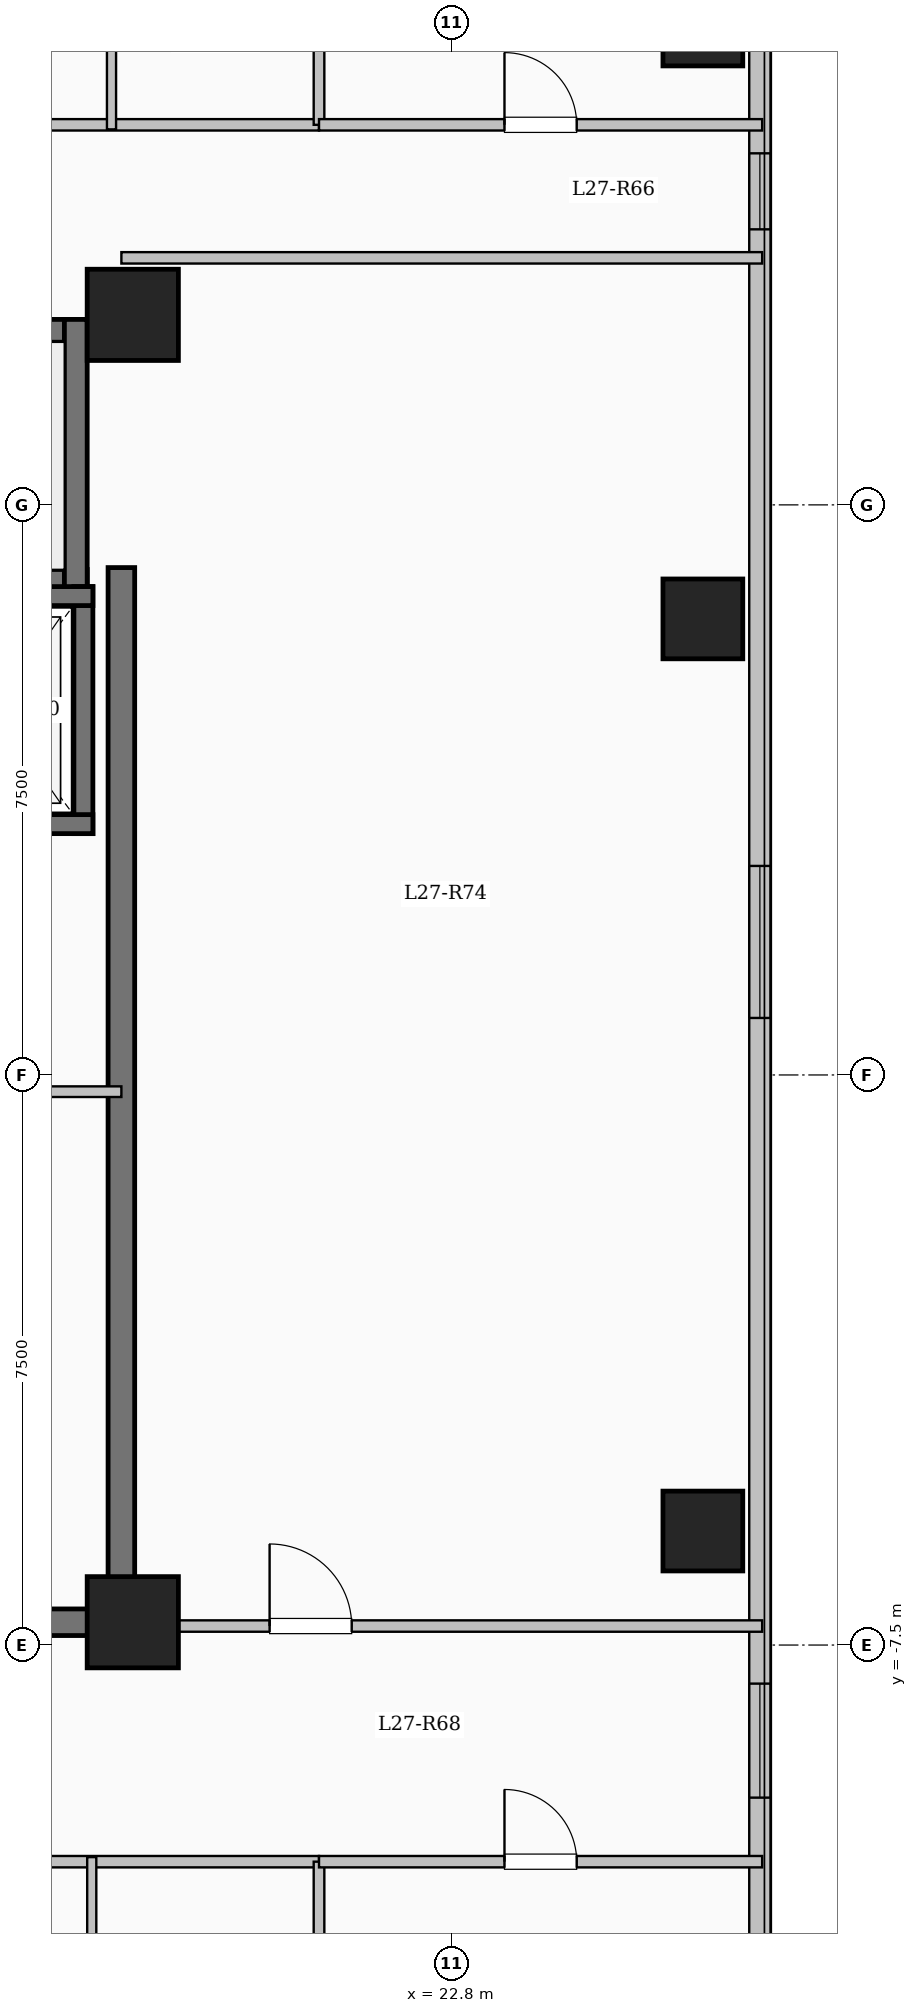
"""IFC4 building model, lengths in metres.
Left out: names, types, materials, properties, quantities, classifications, styles, units other than length and angle.
Written with IfcOpenShell. Run it as: python <this file> out.ifc"""

import sys

from ifc_helpers import new_model, si_unit, direction, frame, frame_2d, origin, origin_2d, place, context, subcontext, project, spatial, rectangle, extrude, element, fill, save


model = new_model("IFC4")
c1 = context("Model", 3, precision=1e-05, world=origin(), true_north=direction((0.0, 1.0)))
c2 = subcontext(c1, "Body", "Model", "MODEL_VIEW")
j1 = project(units=[si_unit("LENGTHUNIT", "METRE"), si_unit("PLANEANGLEUNIT", "RADIAN")], contexts=[c1])
p1 = place(None, origin())
s1 = spatial("IfcSite", under=j1, at=p1, CompositionType="ELEMENT")
p2 = place(p1, origin())
s2 = spatial("IfcBuilding", under=s1, at=p2, CompositionType="ELEMENT")
p3 = place(p2, frame((0.0, 0.0, 101.75)))
s3 = spatial("IfcBuildingStorey", under=s2, at=p3, CompositionType="ELEMENT", Elevation=101.75)
for number, where, z_axis, x_axis in (
    (1, (18.6, -7.2, 0.0), (0.0, 0.0, 1.0), (1.0, 0.0, 0.0)),
    (2, (18.6, 10.0, 0.0), (0.0, 0.0, 1.0), (1.0, 0.0, 0.0)),
):
    element("IfcColumn", number, at=place(p3, frame(where, z_axis=z_axis, x_axis=x_axis)), inside=s3, PredefinedType="COLUMN", context=c2, shape_type="SweptSolid", body=[
        extrude(rectangle(XDim=1.2, YDim=1.2, at=origin_2d()), origin(), (0.0, 0.0, 1.0), 3.35),
    ])
for number, where, z_axis, x_axis in (
    (3, (26.1, -6.0, 0.0), (0.0, 0.0, 1.0), (1.0, 0.0, 0.0)),
    (4, (26.1, 6.0, 0.0), (0.0, 0.0, 1.0), (1.0, 0.0, 0.0)),
    (5, (26.1, 13.8, 0.0), (0.0, 0.0, 1.0), (1.0, 0.0, 0.0)),
):
    element("IfcColumn", number, at=place(p3, frame(where, z_axis=z_axis, x_axis=x_axis)), inside=s3, PredefinedType="COLUMN", context=c2, shape_type="SweptSolid", body=[
        extrude(rectangle(XDim=1.05, YDim=1.05, at=origin_2d()), origin(), (0.0, 0.0, 1.0), 3.35),
    ])
p4 = place(p3, frame((26.85, 17.85, 0.0), z_axis=(0.0, 0.0, 1.0), x_axis=(0.0, -1.0, 0.0)))
e6 = element("IfcWall", 6, at=p4, inside=s3, PredefinedType="SOLIDWALL", context=c2, shape_type="SweptSolid", body=[
    extrude(rectangle(XDim=35.7, YDim=0.28, at=frame_2d((17.85, 0.0))), origin(), (0.0, 0.0, 1.0), 3.1),
])
p5 = place(p4, frame((1.675, 0.0, 0.9)))
e7 = element("IfcOpeningElement", 7, at=p5, cuts=e6, PredefinedType="OPENING", context=c2, shape_type="SweptSolid", body=[
    extrude(rectangle(XDim=2.0, YDim=1.7, at=frame_2d((1.0, 0.85))), frame((0.0, 0.15, 0.0), z_axis=(0.0, -1.0, 0.0), x_axis=(1.0, 0.0, 0.0)), (0.0, 0.0, 1.0), 0.3),
])
p6 = place(p4, frame((5.725, 0.0, 0.95)))
e8 = element("IfcOpeningElement", 8, at=p6, cuts=e6, PredefinedType="OPENING", context=c2, shape_type="SweptSolid", body=[
    extrude(rectangle(XDim=1.0, YDim=1.5, at=frame_2d((0.5, 0.75))), frame((0.0, 0.15, 0.0), z_axis=(0.0, -1.0, 0.0), x_axis=(1.0, 0.0, 0.0)), (0.0, 0.0, 1.0), 0.3),
])
p7 = place(p4, frame((15.1, 0.0, 0.9)))
e9 = element("IfcOpeningElement", 9, at=p7, cuts=e6, PredefinedType="OPENING", context=c2, shape_type="SweptSolid", body=[
    extrude(rectangle(XDim=2.0, YDim=1.7, at=frame_2d((1.0, 0.85))), frame((0.0, 0.15, 0.0), z_axis=(0.0, -1.0, 0.0), x_axis=(1.0, 0.0, 0.0)), (0.0, 0.0, 1.0), 0.3),
])
p8 = place(p4, frame((25.857, 0.0, 0.9)))
e10 = element("IfcOpeningElement", 10, at=p8, cuts=e6, PredefinedType="OPENING", context=c2, shape_type="SweptSolid", body=[
    extrude(rectangle(XDim=1.5, YDim=1.65, at=frame_2d((0.75, 0.825))), frame((0.0, 0.15, 0.0), z_axis=(0.0, -1.0, 0.0), x_axis=(1.0, 0.0, 0.0)), (0.0, 0.0, 1.0), 0.3),
])
p9 = place(p4, frame((30.75, 0.0, 0.9)))
e11 = element("IfcOpeningElement", 11, at=p9, cuts=e6, PredefinedType="OPENING", context=c2, shape_type="SweptSolid", body=[
    extrude(rectangle(XDim=2.4, YDim=1.8, at=frame_2d((1.2, 0.9))), frame((0.0, 0.15, 0.0), z_axis=(0.0, -1.0, 0.0), x_axis=(1.0, 0.0, 0.0)), (0.0, 0.0, 1.0), 0.3),
])
p10 = place(p3, frame((10.0, 9.79, 0.0), z_axis=(0.0, 0.0, 1.0), x_axis=(1.0, 0.0, 0.0)))
e12 = element("IfcWall", 12, at=p10, inside=s3, PredefinedType="SHEAR", context=c2, shape_type="SweptSolid", body=[
    extrude(rectangle(XDim=8.0, YDim=0.3, at=frame_2d((4.0, 0.0))), origin(), (0.0, 0.0, 1.0), 3.35),
])
p11 = place(p3, frame((10.0, 6.5, 0.0), z_axis=(0.0, 0.0, 1.0), x_axis=(1.0, 0.0, 0.0)))
e13 = element("IfcWall", 13, at=p11, inside=s3, PredefinedType="SHEAR", context=c2, shape_type="SweptSolid", body=[
    extrude(rectangle(XDim=8.0, YDim=0.3, at=frame_2d((4.0, 0.0))), origin(), (0.0, 0.0, 1.0), 3.35),
])
p12 = place(p11, frame((0.55, 0.0, 0.0)))
e14 = element("IfcOpeningElement", 14, at=p12, cuts=e13, PredefinedType="OPENING", context=c2, shape_type="SweptSolid", body=[
    extrude(rectangle(XDim=1.0, YDim=2.15, at=frame_2d((0.5, 1.075))), frame((0.0, 0.16, 0.0), z_axis=(0.0, -1.0, 0.0), x_axis=(1.0, 0.0, 0.0)), (0.0, 0.0, 1.0), 0.32),
])
p13 = place(p3, frame((17.85, 6.35, 0.0), z_axis=(0.0, 0.0, 1.0), x_axis=(0.0, 1.0, 0.0)))
e15 = element("IfcWall", 15, at=p13, inside=s3, PredefinedType="SHEAR", context=c2, shape_type="SweptSolid", body=[
    extrude(rectangle(XDim=3.59, YDim=0.3, at=frame_2d((1.795, 0.0))), origin(), (0.0, 0.0, 1.0), 3.35),
])
p14 = place(p3, frame((17.95, 3.175, 0.0), z_axis=(0.0, 0.0, 1.0), x_axis=(0.0, 1.0, 0.0)))
e16 = element("IfcWall", 16, at=p14, inside=s3, PredefinedType="SHEAR", context=c2, shape_type="SweptSolid", body=[
    extrude(rectangle(XDim=3.25, YDim=0.25, at=frame_2d((1.625, 0.0))), origin(), (0.0, 0.0, 1.0), 3.35),
])
for number, where, z_axis, x_axis in (
    (17, (15.525, 3.3, 0.0), (0.0, 0.0, 1.0), (1.0, 0.0, 0.0)),
    (18, (15.525, 6.3, 0.0), (0.0, 0.0, 1.0), (1.0, 0.0, 0.0)),
):
    element("IfcWall", number, at=place(p3, frame(where, z_axis=z_axis, x_axis=x_axis)), inside=s3, PredefinedType="SHEAR", context=c2, shape_type="SweptSolid", body=[
        extrude(rectangle(XDim=2.55, YDim=0.25, at=frame_2d((1.275, 0.0))), origin(), (0.0, 0.0, 1.0), 3.35),
    ])
p15 = place(p3, frame((18.45, -7.375, 0.0), z_axis=(0.0, 0.0, 1.0), x_axis=(0.0, 1.0, 0.0)))
e19 = element("IfcWall", 19, at=p15, inside=s3, PredefinedType="SHEAR", context=c2, shape_type="SweptSolid", body=[
    extrude(rectangle(XDim=14.05, YDim=0.35, at=frame_2d((7.025, 0.0))), origin(), (0.0, 0.0, 1.0), 3.35),
])
p16 = place(p3, frame((10.075, -7.2, 0.0), z_axis=(0.0, 0.0, 1.0), x_axis=(1.0, 0.0, 0.0)))
e20 = element("IfcWall", 20, at=p16, inside=s3, PredefinedType="SHEAR", context=c2, shape_type="SweptSolid", body=[
    extrude(rectangle(XDim=8.55, YDim=0.35, at=frame_2d((4.275, 0.0))), origin(), (0.0, 0.0, 1.0), 3.35),
])
p17 = place(p3, frame((15.4, -0.22, 0.0), z_axis=(0.0, 0.0, 1.0), x_axis=(1.0, 0.0, 0.0)))
e21 = element("IfcWall", 21, at=p17, inside=s3, PredefinedType="PARTITIONING", context=c2, shape_type="SweptSolid", body=[
    extrude(rectangle(XDim=3.05, YDim=0.14, at=frame_2d((1.525, 0.0))), origin(), (0.0, 0.0, 1.0), 3.1),
])
p18 = place(p17, frame((1.05, 0.0, 0.0)))
e22 = element("IfcOpeningElement", 22, at=p18, cuts=e21, PredefinedType="OPENING", context=c2, shape_type="SweptSolid", body=[
    extrude(rectangle(XDim=0.9, YDim=2.08, at=frame_2d((0.45, 1.04))), frame((0.0, 0.08, 0.0), z_axis=(0.0, -1.0, 0.0), x_axis=(1.0, 0.0, 0.0)), (0.0, 0.0, 1.0), 0.16),
])
p19 = place(p3, frame((3.85, 12.5, 0.0), z_axis=(0.0, 0.0, 1.0), x_axis=(1.0, 0.0, 0.0)))
e23 = element("IfcWall", 23, at=p19, inside=s3, PredefinedType="PARTITIONING", context=c2, shape_type="SweptSolid", body=[
    extrude(rectangle(XDim=17.2, YDim=0.15, at=frame_2d((8.6, 0.0))), origin(), (0.0, 0.0, 1.0), 3.1),
])
p20 = place(p19, frame((1.6, 0.0, 0.0)))
e24 = element("IfcOpeningElement", 24, at=p20, cuts=e23, PredefinedType="OPENING", context=c2, shape_type="SweptSolid", body=[
    extrude(rectangle(XDim=0.96, YDim=2.15, at=frame_2d((0.48, 1.075))), frame((0.0, 0.085, 0.0), z_axis=(0.0, -1.0, 0.0), x_axis=(1.0, 0.0, 0.0)), (0.0, 0.0, 1.0), 0.17),
])
p21 = place(p19, frame((6.42, 0.0, 0.0)))
e25 = element("IfcOpeningElement", 25, at=p21, cuts=e23, PredefinedType="OPENING", context=c2, shape_type="SweptSolid", body=[
    extrude(rectangle(XDim=0.96, YDim=2.15, at=frame_2d((0.48, 1.075))), frame((0.0, 0.085, 0.0), z_axis=(0.0, -1.0, 0.0), x_axis=(1.0, 0.0, 0.0)), (0.0, 0.0, 1.0), 0.17),
])
p22 = place(p3, frame((8.55, -10.35, 0.0), z_axis=(0.0, 0.0, 1.0), x_axis=(1.0, 0.0, 0.0)))
e26 = element("IfcWall", 26, at=p22, inside=s3, PredefinedType="PARTITIONING", context=c2, shape_type="SweptSolid", body=[
    extrude(rectangle(XDim=12.5, YDim=0.15, at=frame_2d((6.25, 0.0))), origin(), (0.0, 0.0, 1.0), 3.1),
])
p23 = place(p22, frame((0.75, 0.0, 0.0)))
e27 = element("IfcOpeningElement", 27, at=p23, cuts=e26, PredefinedType="OPENING", context=c2, shape_type="SweptSolid", body=[
    extrude(rectangle(XDim=0.96, YDim=2.15, at=frame_2d((0.48, 1.075))), frame((0.0, 0.085, 0.0), z_axis=(0.0, -1.0, 0.0), x_axis=(1.0, 0.0, 0.0)), (0.0, 0.0, 1.0), 0.17),
])
p24 = place(p22, frame((6.975, 0.0, 0.0)))
e28 = element("IfcOpeningElement", 28, at=p24, cuts=e26, PredefinedType="OPENING", context=c2, shape_type="SweptSolid", body=[
    extrude(rectangle(XDim=0.96, YDim=2.15, at=frame_2d((0.48, 1.075))), frame((0.0, 0.085, 0.0), z_axis=(0.0, -1.0, 0.0), x_axis=(1.0, 0.0, 0.0)), (0.0, 0.0, 1.0), 0.17),
])
p25 = place(p3, frame((18.32, 12.44, 0.0), z_axis=(0.0, 0.0, 1.0), x_axis=(0.0, 1.0, 0.0)))
e29 = element("IfcWall", 29, at=p25, inside=s3, PredefinedType="PARTITIONING", context=c2, shape_type="SweptSolid", body=[
    extrude(rectangle(XDim=2.45, YDim=0.12, at=frame_2d((1.225, 0.0))), origin(), (0.0, 0.0, 1.0), 3.1),
])
p26 = place(p3, frame((18.06, -13.51, 0.0), z_axis=(0.0, 0.0, 1.0), x_axis=(0.0, 1.0, 0.0)))
e30 = element("IfcWall", 30, at=p26, inside=s3, PredefinedType="PARTITIONING", context=c2, shape_type="SweptSolid", body=[
    extrude(rectangle(XDim=3.22, YDim=0.12, at=frame_2d((1.61, 0.0))), origin(), (0.0, 0.0, 1.0), 3.1),
])
p27 = place(p26, frame((1.14, 0.0, 0.0)))
e31 = element("IfcOpeningElement", 31, at=p27, cuts=e30, PredefinedType="OPENING", context=c2, shape_type="SweptSolid", body=[
    extrude(rectangle(XDim=0.88, YDim=2.1, at=frame_2d((0.44, 1.05))), frame((0.0, 0.07, 0.0), z_axis=(0.0, -1.0, 0.0), x_axis=(1.0, 0.0, 0.0)), (0.0, 0.0, 1.0), 0.14),
])
p28 = place(p3, frame((18.45, -7.25, 0.0), z_axis=(0.0, 0.0, 1.0), x_axis=(1.0, 0.0, 0.0)))
e32 = element("IfcWall", 32, at=p28, inside=s3, PredefinedType="PARTITIONING", context=c2, shape_type="SweptSolid", body=[
    extrude(rectangle(XDim=8.43, YDim=0.15, at=frame_2d((4.215, 0.0))), origin(), (0.0, 0.0, 1.0), 3.1),
])
p29 = place(p28, frame((1.95, 0.0, 0.0)))
e33 = element("IfcOpeningElement", 33, at=p29, cuts=e32, PredefinedType="OPENING", context=c2, shape_type="SweptSolid", body=[
    extrude(rectangle(XDim=1.08, YDim=2.15, at=frame_2d((0.54, 1.075))), frame((0.0, 0.085, 0.0), z_axis=(0.0, -1.0, 0.0), x_axis=(1.0, 0.0, 0.0)), (0.0, 0.0, 1.0), 0.17),
])
p30 = place(p3, frame((18.45, 10.75, 0.0), z_axis=(0.0, 0.0, 1.0), x_axis=(1.0, 0.0, 0.0)))
e34 = element("IfcWall", 34, at=p30, inside=s3, PredefinedType="PARTITIONING", context=c2, shape_type="SweptSolid", body=[
    extrude(rectangle(XDim=8.43, YDim=0.15, at=frame_2d((4.215, 0.0))), origin(), (0.0, 0.0, 1.0), 3.1),
])
p31 = place(p3, frame((21.05, -17.85, 0.0), z_axis=(0.0, 0.0, 1.0), x_axis=(0.0, 1.0, 0.0)))
e35 = element("IfcWall", 35, at=p31, inside=s3, PredefinedType="PARTITIONING", context=c2, shape_type="SweptSolid", body=[
    extrude(rectangle(XDim=7.5, YDim=0.14, at=frame_2d((3.75, 0.0))), origin(), (0.0, 0.0, 1.0), 3.1),
])
p32 = place(p3, frame((21.05, 12.5, 0.0), z_axis=(0.0, 0.0, 1.0), x_axis=(0.0, 1.0, 0.0)))
e36 = element("IfcWall", 36, at=p32, inside=s3, PredefinedType="PARTITIONING", context=c2, shape_type="SweptSolid", body=[
    extrude(rectangle(XDim=5.35, YDim=0.14, at=frame_2d((2.675, 0.0))), origin(), (0.0, 0.0, 1.0), 3.1),
])
p33 = place(p3, frame((21.05, 12.5, 0.0), z_axis=(0.0, 0.0, 1.0), x_axis=(1.0, 0.0, 0.0)))
e37 = element("IfcWall", 37, at=p33, inside=s3, PredefinedType="PARTITIONING", context=c2, shape_type="SweptSolid", body=[
    extrude(rectangle(XDim=5.83, YDim=0.15, at=frame_2d((2.915, 0.0))), origin(), (0.0, 0.0, 1.0), 3.1),
])
p34 = place(p33, frame((2.44, 0.0, 0.0)))
e38 = element("IfcOpeningElement", 38, at=p34, cuts=e37, PredefinedType="OPENING", context=c2, shape_type="SweptSolid", body=[
    extrude(rectangle(XDim=0.95, YDim=2.15, at=frame_2d((0.475, 1.075))), frame((0.0, 0.085, 0.0), z_axis=(0.0, -1.0, 0.0), x_axis=(1.0, 0.0, 0.0)), (0.0, 0.0, 1.0), 0.17),
])
p35 = place(p3, frame((21.05, -10.35, 0.0), z_axis=(0.0, 0.0, 1.0), x_axis=(1.0, 0.0, 0.0)))
e39 = element("IfcWall", 39, at=p35, inside=s3, PredefinedType="PARTITIONING", context=c2, shape_type="SweptSolid", body=[
    extrude(rectangle(XDim=5.83, YDim=0.15, at=frame_2d((2.915, 0.0))), origin(), (0.0, 0.0, 1.0), 3.1),
])
p36 = place(p35, frame((2.44, 0.0, 0.0)))
e40 = element("IfcOpeningElement", 40, at=p36, cuts=e39, PredefinedType="OPENING", context=c2, shape_type="SweptSolid", body=[
    extrude(rectangle(XDim=0.95, YDim=2.15, at=frame_2d((0.475, 1.075))), frame((0.0, 0.085, 0.0), z_axis=(0.0, -1.0, 0.0), x_axis=(1.0, 0.0, 0.0)), (0.0, 0.0, 1.0), 0.17),
])
p37 = place(p6, origin())
e41 = element("IfcWindow", 41, at=p37, inside=s3, PartitioningType="SINGLE_PANEL", PredefinedType="WINDOW", context=c2, shape_type="SweptSolid", body=[
    extrude(rectangle(XDim=1.0, YDim=1.5, at=frame_2d((0.5, 0.75))), frame((0.0, 0.03, 0.0), z_axis=(0.0, -1.0, 0.0), x_axis=(1.0, 0.0, 0.0)), (0.0, 0.0, 1.0), 0.06),
])
fill(e8, e41)
p38 = place(p7, origin())
e42 = element("IfcWindow", 42, at=p38, inside=s3, PartitioningType="SINGLE_PANEL", PredefinedType="WINDOW", context=c2, shape_type="SweptSolid", body=[
    extrude(rectangle(XDim=2.0, YDim=1.7, at=frame_2d((1.0, 0.85))), frame((0.0, 0.03, 0.0), z_axis=(0.0, -1.0, 0.0), x_axis=(1.0, 0.0, 0.0)), (0.0, 0.0, 1.0), 0.06),
])
fill(e9, e42)
p39 = place(p8, origin())
e43 = element("IfcWindow", 43, at=p39, inside=s3, PartitioningType="SINGLE_PANEL", PredefinedType="WINDOW", context=c2, shape_type="SweptSolid", body=[
    extrude(rectangle(XDim=1.5, YDim=1.65, at=frame_2d((0.75, 0.825))), frame((0.0, 0.03, 0.0), z_axis=(0.0, -1.0, 0.0), x_axis=(1.0, 0.0, 0.0)), (0.0, 0.0, 1.0), 0.06),
])
fill(e10, e43)
p40 = place(p34, origin())
e44 = element("IfcDoor", 44, at=p40, inside=s3, OperationType="SINGLE_SWING_LEFT", PredefinedType="DOOR", context=c2, shape_type="SweptSolid", body=[
    extrude(rectangle(XDim=0.95, YDim=2.15, at=frame_2d((0.475, 1.075))), frame((0.0, 0.025, 0.0), z_axis=(0.0, -1.0, 0.0), x_axis=(1.0, 0.0, 0.0)), (0.0, 0.0, 1.0), 0.05),
])
fill(e38, e44)
p41 = place(p36, origin())
e45 = element("IfcDoor", 45, at=p41, inside=s3, OperationType="SINGLE_SWING_LEFT", PredefinedType="DOOR", context=c2, shape_type="SweptSolid", body=[
    extrude(rectangle(XDim=0.95, YDim=2.15, at=frame_2d((0.475, 1.075))), frame((0.0, 0.025, 0.0), z_axis=(0.0, -1.0, 0.0), x_axis=(1.0, 0.0, 0.0)), (0.0, 0.0, 1.0), 0.05),
])
fill(e40, e45)
p42 = place(p29, origin())
e46 = element("IfcDoor", 46, at=p42, inside=s3, OperationType="SINGLE_SWING_LEFT", PredefinedType="DOOR", context=c2, shape_type="SweptSolid", body=[
    extrude(rectangle(XDim=1.08, YDim=2.15, at=frame_2d((0.54, 1.075))), frame((0.0, 0.025, 0.0), z_axis=(0.0, -1.0, 0.0), x_axis=(1.0, 0.0, 0.0)), (0.0, 0.0, 1.0), 0.05),
])
fill(e33, e46)
save(model, sys.argv[1])
